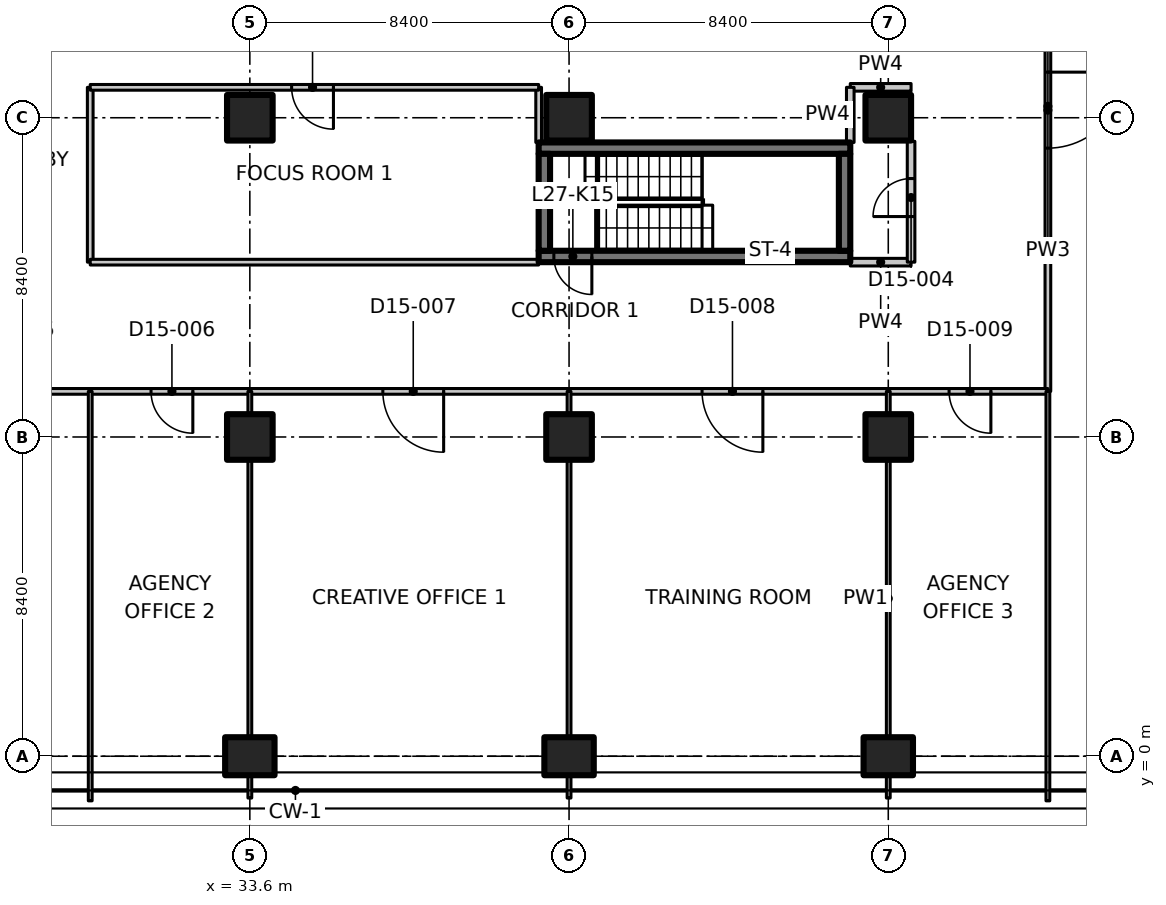
"""IFC4 building model, lengths in metres.
Left out: names, types, materials, properties, quantities, classifications, styles, units other than length and angle.
Written with IfcOpenShell. Run it as: python <this file> out.ifc"""

import sys

from ifc_helpers import new_model, si_unit, direction, frame, frame_2d, origin, origin_2d, place, context, subcontext, project, spatial, polyline, rectangle, outline, extrude, element, fill, save


model = new_model("IFC4")
c1 = context("Model", 3, precision=1e-05, world=origin(), true_north=direction((0.0, 1.0)))
c2 = subcontext(c1, "Body", "Model", "MODEL_VIEW")
j1 = project(units=[si_unit("LENGTHUNIT", "METRE"), si_unit("PLANEANGLEUNIT", "RADIAN")], contexts=[c1])
p1 = place(None, origin())
s1 = spatial("IfcSite", under=j1, at=p1, CompositionType="ELEMENT")
p2 = place(p1, origin())
s2 = spatial("IfcBuilding", under=s1, at=p2, CompositionType="ELEMENT")
p3 = place(p2, frame((0.0, 0.0, 113.3)))
s3 = spatial("IfcBuildingStorey", under=s2, at=p3, CompositionType="ELEMENT", Elevation=113.3)
p4 = place(p3, frame((33.6, 0.0, 0.0), z_axis=(0.0, 0.0, 1.0), x_axis=(0.0, 1.0, 0.0)))
e1 = element("IfcColumn", 1, at=p4, inside=s3, PredefinedType="COLUMN", context=c2, shape_type="SweptSolid", body=[
    extrude(rectangle(XDim=1.0, YDim=1.3, at=origin_2d()), origin(), (0.0, 0.0, 1.0), 3.35),
])
for number, where, z_axis, x_axis in (
    (2, (33.6, 8.4, 0.0), (0.0, 0.0, 1.0), (1.0, 0.0, 0.0)),
    (3, (33.6, 16.8, 0.0), (0.0, 0.0, 1.0), (1.0, 0.0, 0.0)),
):
    element("IfcColumn", number, at=place(p3, frame(where, z_axis=z_axis, x_axis=x_axis)), inside=s3, PredefinedType="COLUMN", context=c2, shape_type="SweptSolid", body=[
        extrude(rectangle(XDim=1.2, YDim=1.2, at=origin_2d()), origin(), (0.0, 0.0, 1.0), 3.35),
    ])
p5 = place(p3, frame((42.0, 0.0, 0.0), z_axis=(0.0, 0.0, 1.0), x_axis=(0.0, 1.0, 0.0)))
e4 = element("IfcColumn", 4, at=p5, inside=s3, PredefinedType="COLUMN", context=c2, shape_type="SweptSolid", body=[
    extrude(rectangle(XDim=1.0, YDim=1.3, at=origin_2d()), origin(), (0.0, 0.0, 1.0), 3.35),
])
for number, where, z_axis, x_axis in (
    (5, (42.0, 8.4, 0.0), (0.0, 0.0, 1.0), (1.0, 0.0, 0.0)),
    (6, (42.0, 16.8, 0.0), (0.0, 0.0, 1.0), (1.0, 0.0, 0.0)),
):
    element("IfcColumn", number, at=place(p3, frame(where, z_axis=z_axis, x_axis=x_axis)), inside=s3, PredefinedType="COLUMN", context=c2, shape_type="SweptSolid", body=[
        extrude(rectangle(XDim=1.2, YDim=1.2, at=origin_2d()), origin(), (0.0, 0.0, 1.0), 3.35),
    ])
p6 = place(p3, frame((50.4, 0.0, 0.0), z_axis=(0.0, 0.0, 1.0), x_axis=(0.0, 1.0, 0.0)))
e7 = element("IfcColumn", 7, at=p6, inside=s3, PredefinedType="COLUMN", context=c2, shape_type="SweptSolid", body=[
    extrude(rectangle(XDim=1.0, YDim=1.3, at=origin_2d()), origin(), (0.0, 0.0, 1.0), 3.35),
])
for number, where, z_axis, x_axis in (
    (8, (50.4, 8.4, 0.0), (0.0, 0.0, 1.0), (1.0, 0.0, 0.0)),
    (9, (50.4, 16.8, 0.0), (0.0, 0.0, 1.0), (1.0, 0.0, 0.0)),
):
    element("IfcColumn", number, at=place(p3, frame(where, z_axis=z_axis, x_axis=x_axis)), inside=s3, PredefinedType="COLUMN", context=c2, shape_type="SweptSolid", body=[
        extrude(rectangle(XDim=1.2, YDim=1.2, at=origin_2d()), origin(), (0.0, 0.0, 1.0), 3.35),
    ])
p7 = place(p3, frame((49.4, 13.15, 0.0), z_axis=(0.0, 0.0, 1.0), x_axis=(-1.0, 0.0, 0.0)))
e10 = element("IfcWall", 10, at=p7, inside=s3, PredefinedType="SHEAR", context=c2, shape_type="SweptSolid", body=[
    extrude(rectangle(XDim=8.2, YDim=0.3, at=frame_2d((4.1, 0.0))), origin(), (0.0, 0.0, 1.0), 3.35),
])
p8 = place(p7, frame((6.8, 0.0, 0.0)))
e11 = element("IfcOpeningElement", 11, at=p8, cuts=e10, PredefinedType="OPENING", context=c2, shape_type="SweptSolid", body=[
    extrude(rectangle(XDim=1.0, YDim=2.1, at=frame_2d((0.5, 1.05))), frame((0.0, 0.16, 0.0), z_axis=(0.0, -1.0, 0.0), x_axis=(1.0, 0.0, 0.0)), (0.0, 0.0, 1.0), 0.32),
])
p9 = place(p3, frame((41.2, 16.0, 0.0), z_axis=(0.0, 0.0, 1.0), x_axis=(1.0, 0.0, 0.0)))
e12 = element("IfcWall", 12, at=p9, inside=s3, PredefinedType="SHEAR", context=c2, shape_type="SweptSolid", body=[
    extrude(rectangle(XDim=8.2, YDim=0.3, at=frame_2d((4.1, 0.0))), origin(), (0.0, 0.0, 1.0), 3.35),
])
for number, where, z_axis, x_axis in (
    (13, (41.35, 13.3, 0.0), (0.0, 0.0, 1.0), (0.0, 1.0, 0.0)),
    (14, (49.25, 13.3, 0.0), (0.0, 0.0, 1.0), (0.0, 1.0, 0.0)),
):
    element("IfcWall", number, at=place(p3, frame(where, z_axis=z_axis, x_axis=x_axis)), inside=s3, PredefinedType="SHEAR", context=c2, shape_type="SweptSolid", body=[
        extrude(rectangle(XDim=2.55, YDim=0.3, at=frame_2d((1.275, 0.0))), origin(), (0.0, 0.0, 1.0), 3.35),
    ])
p10 = place(p3, frame((29.4, 17.6, 0.0), z_axis=(0.0, 0.0, 1.0), x_axis=(0.0, -1.0, 0.0)))
e15 = element("IfcWall", 15, at=p10, inside=s3, PredefinedType="PARTITIONING", context=c2, shape_type="SweptSolid", body=[
    extrude(rectangle(XDim=4.6, YDim=0.15, at=frame_2d((2.3, 0.0))), origin(), (0.0, 0.0, 1.0), 3.33),
])
p11 = place(p3, frame((29.4, 9.6, 0.0), z_axis=(0.0, 0.0, 1.0), x_axis=(-1.0, 0.0, 0.0)))
e16 = element("IfcWall", 16, at=p11, inside=s3, PredefinedType="PARTITIONING", context=c2, shape_type="SweptSolid", body=[
    extrude(rectangle(XDim=4.2, YDim=0.15, at=frame_2d((2.1, 0.0))), origin(), (0.0, 0.0, 1.0), 3.33),
])
p12 = place(p11, frame((1.5, 0.0, 0.0)))
e17 = element("IfcOpeningElement", 17, at=p12, cuts=e16, PredefinedType="OPENING", context=c2, shape_type="SweptSolid", body=[
    extrude(rectangle(XDim=1.1, YDim=2.1, at=frame_2d((0.55, 1.05))), frame((0.0, 0.085, 0.0), z_axis=(0.0, -1.0, 0.0), x_axis=(1.0, 0.0, 0.0)), (0.0, 0.0, 1.0), 0.17),
])
p13 = place(p3, frame((54.6, 13.0, 0.0), z_axis=(0.0, 0.0, 1.0), x_axis=(0.0, -1.0, 0.0)))
e18 = element("IfcWall", 18, at=p13, inside=s3, PredefinedType="PARTITIONING", context=c2, shape_type="SweptSolid", body=[
    extrude(rectangle(XDim=3.4, YDim=0.15, at=frame_2d((1.7, 0.0))), origin(), (0.0, 0.0, 1.0), 3.33),
])
p14 = place(p3, frame((29.4, 13.0, 0.0), z_axis=(0.0, 0.0, 1.0), x_axis=(1.0, 0.0, 0.0)))
e19 = element("IfcWall", 19, at=p14, inside=s3, PredefinedType="PARTITIONING", context=c2, shape_type="SweptSolid", body=[
    extrude(rectangle(XDim=11.8, YDim=0.15, at=frame_2d((5.9, 0.0))), origin(), (0.0, 0.0, 1.0), 3.33),
])
p15 = place(p3, frame((49.4, 13.0, 0.0), z_axis=(0.0, 0.0, 1.0), x_axis=(1.0, 0.0, 0.0)))
e20 = element("IfcWall", 20, at=p15, inside=s3, PredefinedType="PARTITIONING", context=c2, shape_type="SweptSolid", body=[
    extrude(rectangle(XDim=1.6, YDim=0.2, at=frame_2d((0.8, 0.0))), origin(), (0.0, 0.0, 1.0), 3.33),
])
p16 = place(p3, frame((33.6, 9.6, 0.0), z_axis=(0.0, 0.0, 1.0), x_axis=(-1.0, 0.0, 0.0)))
e21 = element("IfcWall", 21, at=p16, inside=s3, PredefinedType="PARTITIONING", context=c2, shape_type="SweptSolid", body=[
    extrude(rectangle(XDim=4.2, YDim=0.15, at=frame_2d((2.1, 0.0))), origin(), (0.0, 0.0, 1.0), 3.33),
])
p17 = place(p16, frame((1.5, 0.0, 0.0)))
e22 = element("IfcOpeningElement", 22, at=p17, cuts=e21, PredefinedType="OPENING", context=c2, shape_type="SweptSolid", body=[
    extrude(rectangle(XDim=1.1, YDim=2.1, at=frame_2d((0.55, 1.05))), frame((0.0, 0.085, 0.0), z_axis=(0.0, -1.0, 0.0), x_axis=(1.0, 0.0, 0.0)), (0.0, 0.0, 1.0), 0.17),
])
p18 = place(p3, frame((42.0, 9.6, 0.0), z_axis=(0.0, 0.0, 1.0), x_axis=(-1.0, 0.0, 0.0)))
e23 = element("IfcWall", 23, at=p18, inside=s3, PredefinedType="PARTITIONING", context=c2, shape_type="SweptSolid", body=[
    extrude(rectangle(XDim=8.4, YDim=0.15, at=frame_2d((4.2, 0.0))), origin(), (0.0, 0.0, 1.0), 3.33),
])
p19 = place(p18, frame((3.3, 0.0, 0.0)))
e24 = element("IfcOpeningElement", 24, at=p19, cuts=e23, PredefinedType="OPENING", context=c2, shape_type="SweptSolid", body=[
    extrude(rectangle(XDim=1.6, YDim=2.1, at=frame_2d((0.8, 1.05))), frame((0.0, 0.085, 0.0), z_axis=(0.0, -1.0, 0.0), x_axis=(1.0, 0.0, 0.0)), (0.0, 0.0, 1.0), 0.17),
])
p20 = place(p3, frame((50.4, 9.6, 0.0), z_axis=(0.0, 0.0, 1.0), x_axis=(-1.0, 0.0, 0.0)))
e25 = element("IfcWall", 25, at=p20, inside=s3, PredefinedType="PARTITIONING", context=c2, shape_type="SweptSolid", body=[
    extrude(rectangle(XDim=8.4, YDim=0.15, at=frame_2d((4.2, 0.0))), origin(), (0.0, 0.0, 1.0), 3.33),
])
p21 = place(p20, frame((3.3, 0.0, 0.0)))
e26 = element("IfcOpeningElement", 26, at=p21, cuts=e25, PredefinedType="OPENING", context=c2, shape_type="SweptSolid", body=[
    extrude(rectangle(XDim=1.6, YDim=2.1, at=frame_2d((0.8, 1.05))), frame((0.0, 0.085, 0.0), z_axis=(0.0, -1.0, 0.0), x_axis=(1.0, 0.0, 0.0)), (0.0, 0.0, 1.0), 0.17),
])
p22 = place(p3, frame((54.6, 9.6, 0.0), z_axis=(0.0, 0.0, 1.0), x_axis=(-1.0, 0.0, 0.0)))
e27 = element("IfcWall", 27, at=p22, inside=s3, PredefinedType="PARTITIONING", context=c2, shape_type="SweptSolid", body=[
    extrude(rectangle(XDim=4.2, YDim=0.15, at=frame_2d((2.1, 0.0))), origin(), (0.0, 0.0, 1.0), 3.33),
])
p23 = place(p22, frame((1.5, 0.0, 0.0)))
e28 = element("IfcOpeningElement", 28, at=p23, cuts=e27, PredefinedType="OPENING", context=c2, shape_type="SweptSolid", body=[
    extrude(rectangle(XDim=1.1, YDim=2.1, at=frame_2d((0.55, 1.05))), frame((0.0, 0.085, 0.0), z_axis=(0.0, -1.0, 0.0), x_axis=(1.0, 0.0, 0.0)), (0.0, 0.0, 1.0), 0.17),
])
p24 = place(p3, frame((54.6, 21.2, 0.0), z_axis=(0.0, 0.0, 1.0), x_axis=(0.0, -1.0, 0.0)))
e29 = element("IfcWall", 29, at=p24, inside=s3, PredefinedType="PARTITIONING", context=c2, shape_type="SweptSolid", body=[
    extrude(rectangle(XDim=8.2, YDim=0.15, at=frame_2d((4.1, 0.0))), origin(), (0.0, 0.0, 1.0), 3.33),
])
p25 = place(p24, frame((3.2, 0.0, 0.0)))
e30 = element("IfcOpeningElement", 30, at=p25, cuts=e29, PredefinedType="OPENING", context=c2, shape_type="SweptSolid", body=[
    extrude(rectangle(XDim=2.0, YDim=2.4, at=frame_2d((1.0, 1.2))), frame((0.0, 0.085, 0.0), z_axis=(0.0, -1.0, 0.0), x_axis=(1.0, 0.0, 0.0)), (0.0, 0.0, 1.0), 0.17),
])
p26 = place(p3, frame((54.6, -1.174, 0.0), z_axis=(0.0, 0.0, 1.0), x_axis=(0.0, 1.0, 0.0)))
e31 = element("IfcWall", 31, at=p26, inside=s3, PredefinedType="PARTITIONING", context=c2, shape_type="SweptSolid", body=[
    extrude(outline(polyline([(0.0, 0.0), (10.774, 0.0), (10.774, 3.33), (1.624, 3.33), (1.622, 2.98), (0.726, 2.98), (0.724, 3.33), (0.074, 3.33), (0.0, 3.33), (0.0, 0.0)])), frame((0.0, 0.05, 0.0), z_axis=(0.0, -1.0, 0.0), x_axis=(1.0, 0.0, 0.0)), (0.0, 0.0, 1.0), 0.1),
])
p27 = place(p3, frame((41.2, 16.15, 0.0), z_axis=(0.0, 0.0, 1.0), x_axis=(0.0, 1.0, 0.0)))
e32 = element("IfcWall", 32, at=p27, inside=s3, PredefinedType="PARTITIONING", context=c2, shape_type="SweptSolid", body=[
    extrude(rectangle(XDim=1.45, YDim=0.15, at=frame_2d((0.725, 0.0))), origin(), (0.0, 0.0, 1.0), 3.33),
])
p28 = place(p3, frame((41.2, 17.6, 0.0), z_axis=(0.0, 0.0, 1.0), x_axis=(-1.0, 0.0, 0.0)))
e33 = element("IfcWall", 33, at=p28, inside=s3, PredefinedType="PARTITIONING", context=c2, shape_type="SweptSolid", body=[
    extrude(rectangle(XDim=11.8, YDim=0.15, at=frame_2d((5.9, 0.0))), origin(), (0.0, 0.0, 1.0), 3.33),
])
p29 = place(p28, frame((5.4, 0.0, 0.0)))
e34 = element("IfcOpeningElement", 34, at=p29, cuts=e33, PredefinedType="OPENING", context=c2, shape_type="SweptSolid", body=[
    extrude(rectangle(XDim=1.1, YDim=2.1, at=frame_2d((0.55, 1.05))), frame((0.0, 0.085, 0.0), z_axis=(0.0, -1.0, 0.0), x_axis=(1.0, 0.0, 0.0)), (0.0, 0.0, 1.0), 0.17),
])
p30 = place(p3, frame((51.0, 17.6, 0.0), z_axis=(0.0, 0.0, 1.0), x_axis=(-1.0, 0.0, 0.0)))
e35 = element("IfcWall", 35, at=p30, inside=s3, PredefinedType="PARTITIONING", context=c2, shape_type="SweptSolid", body=[
    extrude(rectangle(XDim=1.6, YDim=0.2, at=frame_2d((0.8, 0.0))), origin(), (0.0, 0.0, 1.0), 3.33),
])
p31 = place(p3, frame((49.4, 17.6, 0.0), z_axis=(0.0, 0.0, 1.0), x_axis=(0.0, -1.0, 0.0)))
e36 = element("IfcWall", 36, at=p31, inside=s3, PredefinedType="PARTITIONING", context=c2, shape_type="SweptSolid", body=[
    extrude(rectangle(XDim=1.45, YDim=0.2, at=frame_2d((0.725, 0.0))), origin(), (0.0, 0.0, 1.0), 3.33),
])
p32 = place(p3, frame((51.0, 13.0, 0.0), z_axis=(0.0, 0.0, 1.0), x_axis=(0.0, 1.0, 0.0)))
e37 = element("IfcWall", 37, at=p32, inside=s3, PredefinedType="PARTITIONING", context=c2, shape_type="SweptSolid", body=[
    extrude(rectangle(XDim=3.18, YDim=0.2, at=frame_2d((1.59, 0.0))), origin(), (0.0, 0.0, 1.0), 3.33),
])
p33 = place(p32, frame((1.2, 0.0, 0.0)))
e38 = element("IfcOpeningElement", 38, at=p33, cuts=e37, PredefinedType="OPENING", context=c2, shape_type="SweptSolid", body=[
    extrude(rectangle(XDim=1.0, YDim=2.1, at=frame_2d((0.5, 1.05))), frame((0.0, 0.11, 0.0), z_axis=(0.0, -1.0, 0.0), x_axis=(1.0, 0.0, 0.0)), (0.0, 0.0, 1.0), 0.22),
])
p34 = place(p3, frame((29.4, 9.6, 0.0), z_axis=(0.0, 0.0, 1.0), x_axis=(0.0, -1.0, 0.0)))
e39 = element("IfcWall", 39, at=p34, inside=s3, PredefinedType="PARTITIONING", context=c2, shape_type="SweptSolid", body=[
    extrude(outline(polyline([(0.0, 0.0), (10.774, 0.0), (10.774, 3.33), (10.7, 3.33), (10.05, 3.33), (10.048, 2.98), (9.152, 2.98), (9.15, 3.33), (0.0, 3.33), (0.0, 0.0)])), frame((0.0, 0.05, 0.0), z_axis=(0.0, -1.0, 0.0), x_axis=(1.0, 0.0, 0.0)), (0.0, 0.0, 1.0), 0.1),
])
p35 = place(p3, frame((33.6, 9.6, 0.0), z_axis=(0.0, 0.0, 1.0), x_axis=(0.0, -1.0, 0.0)))
e40 = element("IfcWall", 40, at=p35, inside=s3, PredefinedType="PARTITIONING", context=c2, shape_type="SweptSolid", body=[
    extrude(rectangle(XDim=0.58, YDim=0.1, at=frame_2d((0.29, 0.0))), origin(), (0.0, 0.0, 1.0), 3.33),
])
p36 = place(p3, frame((33.6, 7.78, 0.0), z_axis=(0.0, 0.0, 1.0), x_axis=(0.0, -1.0, 0.0)))
e41 = element("IfcWall", 41, at=p36, inside=s3, PredefinedType="PARTITIONING", context=c2, shape_type="SweptSolid", body=[
    extrude(rectangle(XDim=7.26, YDim=0.1, at=frame_2d((3.63, 0.0))), origin(), (0.0, 0.0, 1.0), 3.33),
])
for number, where, z_axis, x_axis in (
    (42, (33.6, -0.52, 0.0), (0.0, 0.0, 1.0), (0.0, -1.0, 0.0)),
    (43, (42.0, 9.6, 0.0), (0.0, 0.0, 1.0), (0.0, -1.0, 0.0)),
):
    element("IfcWall", number, at=place(p3, frame(where, z_axis=z_axis, x_axis=x_axis)), inside=s3, PredefinedType="PARTITIONING", context=c2, shape_type="SweptSolid", body=[
        extrude(rectangle(XDim=0.58, YDim=0.1, at=frame_2d((0.29, 0.0))), origin(), (0.0, 0.0, 1.0), 3.33),
    ])
p37 = place(p3, frame((42.0, 7.78, 0.0), z_axis=(0.0, 0.0, 1.0), x_axis=(0.0, -1.0, 0.0)))
e44 = element("IfcWall", 44, at=p37, inside=s3, PredefinedType="PARTITIONING", context=c2, shape_type="SweptSolid", body=[
    extrude(rectangle(XDim=7.26, YDim=0.1, at=frame_2d((3.63, 0.0))), origin(), (0.0, 0.0, 1.0), 3.33),
])
for number, where, z_axis, x_axis in (
    (45, (42.0, -0.52, 0.0), (0.0, 0.0, 1.0), (0.0, -1.0, 0.0)),
    (46, (50.4, 9.6, 0.0), (0.0, 0.0, 1.0), (0.0, -1.0, 0.0)),
):
    element("IfcWall", number, at=place(p3, frame(where, z_axis=z_axis, x_axis=x_axis)), inside=s3, PredefinedType="PARTITIONING", context=c2, shape_type="SweptSolid", body=[
        extrude(rectangle(XDim=0.58, YDim=0.1, at=frame_2d((0.29, 0.0))), origin(), (0.0, 0.0, 1.0), 3.33),
    ])
p38 = place(p3, frame((50.4, 7.78, 0.0), z_axis=(0.0, 0.0, 1.0), x_axis=(0.0, -1.0, 0.0)))
e47 = element("IfcWall", 47, at=p38, inside=s3, PredefinedType="PARTITIONING", context=c2, shape_type="SweptSolid", body=[
    extrude(rectangle(XDim=7.26, YDim=0.1, at=frame_2d((3.63, 0.0))), origin(), (0.0, 0.0, 1.0), 3.33),
])
p39 = place(p3, frame((50.4, -0.52, 0.0), z_axis=(0.0, 0.0, 1.0), x_axis=(0.0, -1.0, 0.0)))
e48 = element("IfcWall", 48, at=p39, inside=s3, PredefinedType="PARTITIONING", context=c2, shape_type="SweptSolid", body=[
    extrude(rectangle(XDim=0.58, YDim=0.1, at=frame_2d((0.29, 0.0))), origin(), (0.0, 0.0, 1.0), 3.33),
])
p40 = place(p8, origin())
e49 = element("IfcDoor", 49, at=p40, inside=s3, OperationType="SINGLE_SWING_RIGHT", PredefinedType="DOOR", context=c2, shape_type="SweptSolid", body=[
    extrude(rectangle(XDim=1.0, YDim=2.1, at=frame_2d((0.5, 1.05))), frame((0.0, 0.025, 0.0), z_axis=(0.0, -1.0, 0.0), x_axis=(1.0, 0.0, 0.0)), (0.0, 0.0, 1.0), 0.05),
])
fill(e11, e49)
p41 = place(p25, origin())
e50 = element("IfcDoor", 50, at=p41, inside=s3, OperationType="DOUBLE_DOOR_SINGLE_SWING", PredefinedType="DOOR", context=c2, shape_type="SweptSolid", body=[
    extrude(rectangle(XDim=2.0, YDim=2.4, at=frame_2d((1.0, 1.2))), frame((0.0, 0.025, 0.0), z_axis=(0.0, -1.0, 0.0), x_axis=(1.0, 0.0, 0.0)), (0.0, 0.0, 1.0), 0.05),
])
fill(e30, e50)
p42 = place(p29, origin())
e51 = element("IfcDoor", 51, at=p42, inside=s3, OperationType="SINGLE_SWING_LEFT", PredefinedType="DOOR", context=c2, shape_type="SweptSolid", body=[
    extrude(rectangle(XDim=1.1, YDim=2.1, at=frame_2d((0.55, 1.05))), frame((0.0, 0.025, 0.0), z_axis=(0.0, -1.0, 0.0), x_axis=(1.0, 0.0, 0.0)), (0.0, 0.0, 1.0), 0.05),
])
fill(e34, e51)
p43 = place(p33, origin())
e52 = element("IfcDoor", 52, at=p43, inside=s3, OperationType="SINGLE_SWING_LEFT", PredefinedType="DOOR", context=c2, shape_type="SweptSolid", body=[
    extrude(rectangle(XDim=1.0, YDim=2.1, at=frame_2d((0.5, 1.05))), frame((0.0, 0.025, 0.0), z_axis=(0.0, -1.0, 0.0), x_axis=(1.0, 0.0, 0.0)), (0.0, 0.0, 1.0), 0.05),
])
fill(e38, e52)
p44 = place(p17, origin())
e53 = element("IfcDoor", 53, at=p44, inside=s3, OperationType="SINGLE_SWING_LEFT", PredefinedType="DOOR", context=c2, shape_type="SweptSolid", body=[
    extrude(rectangle(XDim=1.1, YDim=2.1, at=frame_2d((0.55, 1.05))), frame((0.0, 0.025, 0.0), z_axis=(0.0, -1.0, 0.0), x_axis=(1.0, 0.0, 0.0)), (0.0, 0.0, 1.0), 0.05),
])
fill(e22, e53)
p45 = place(p19, origin())
e54 = element("IfcDoor", 54, at=p45, inside=s3, OperationType="DOUBLE_DOOR_SINGLE_SWING", PredefinedType="DOOR", context=c2, shape_type="SweptSolid", body=[
    extrude(rectangle(XDim=1.6, YDim=2.1, at=frame_2d((0.8, 1.05))), frame((0.0, 0.025, 0.0), z_axis=(0.0, -1.0, 0.0), x_axis=(1.0, 0.0, 0.0)), (0.0, 0.0, 1.0), 0.05),
])
fill(e24, e54)
p46 = place(p21, origin())
e55 = element("IfcDoor", 55, at=p46, inside=s3, OperationType="DOUBLE_DOOR_SINGLE_SWING", PredefinedType="DOOR", context=c2, shape_type="SweptSolid", body=[
    extrude(rectangle(XDim=1.6, YDim=2.1, at=frame_2d((0.8, 1.05))), frame((0.0, 0.025, 0.0), z_axis=(0.0, -1.0, 0.0), x_axis=(1.0, 0.0, 0.0)), (0.0, 0.0, 1.0), 0.05),
])
fill(e26, e55)
p47 = place(p23, origin())
e56 = element("IfcDoor", 56, at=p47, inside=s3, OperationType="SINGLE_SWING_LEFT", PredefinedType="DOOR", context=c2, shape_type="SweptSolid", body=[
    extrude(rectangle(XDim=1.1, YDim=2.1, at=frame_2d((0.55, 1.05))), frame((0.0, 0.025, 0.0), z_axis=(0.0, -1.0, 0.0), x_axis=(1.0, 0.0, 0.0)), (0.0, 0.0, 1.0), 0.05),
])
fill(e28, e56)
save(model, sys.argv[1])
